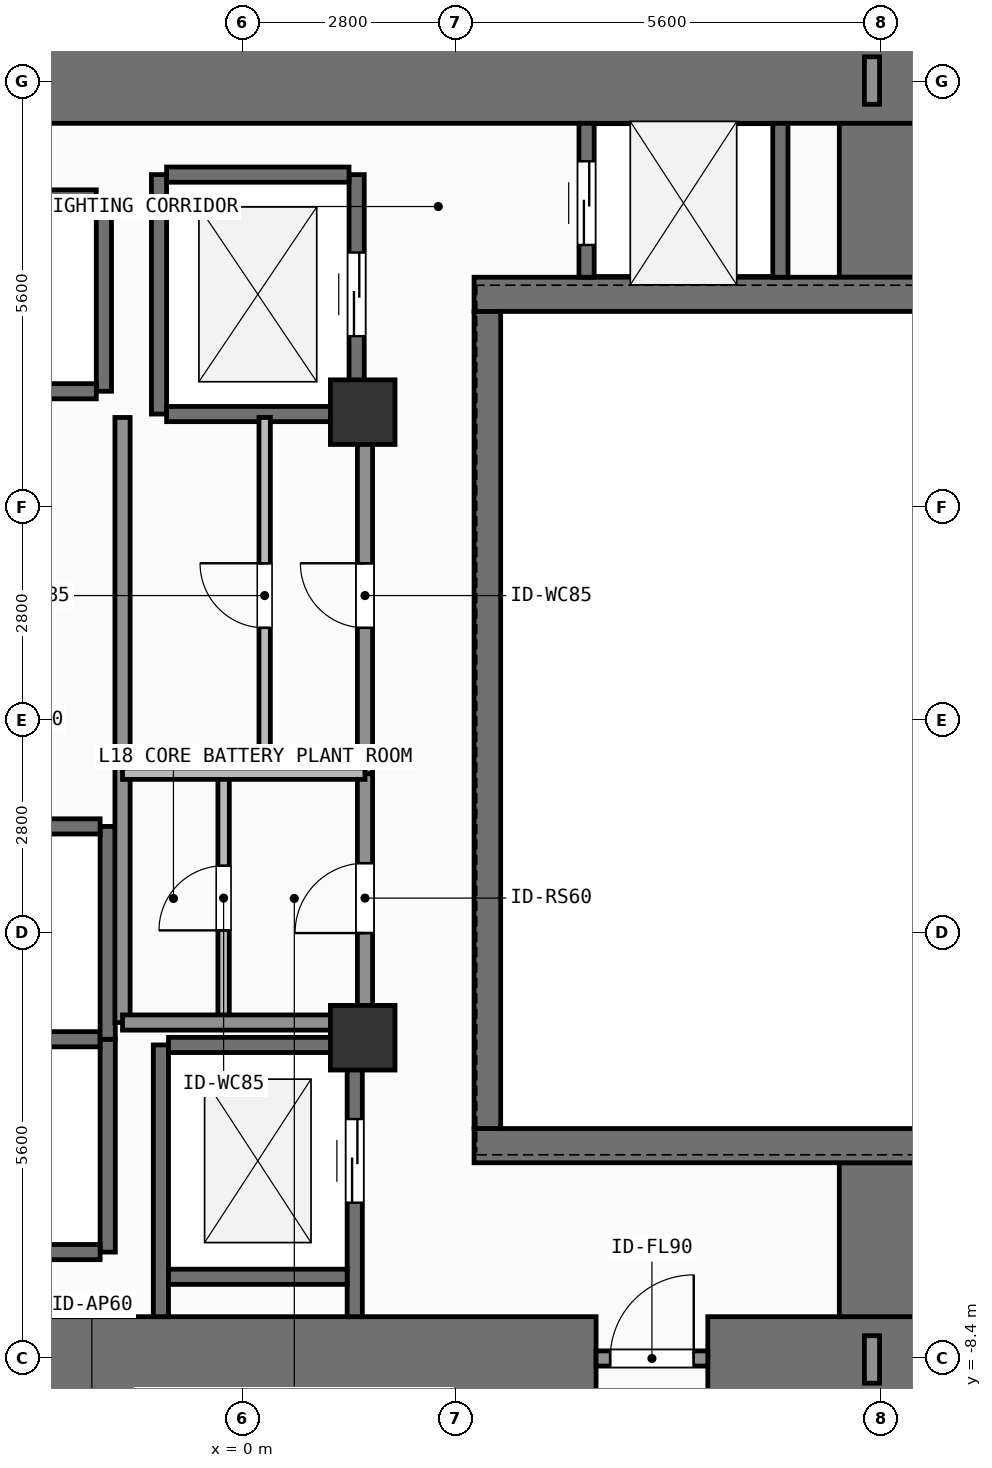
"""IFC4 building model, lengths in metres.
Left out: names, types, materials, properties, quantities, classifications, styles, units other than length and angle.
Written with IfcOpenShell. Run it as: python <this file> out.ifc"""

import sys

from ifc_helpers import new_model, si_unit, direction, frame, frame_2d, origin, origin_2d, place, context, subcontext, project, spatial, rectangle, extrude, element, fill, save


model = new_model("IFC4")
c1 = context("Model", 3, precision=1e-05, world=origin(), true_north=direction((0.0, 1.0)))
c2 = subcontext(c1, "Body", "Model", "MODEL_VIEW")
j1 = project(units=[si_unit("LENGTHUNIT", "METRE"), si_unit("PLANEANGLEUNIT", "RADIAN")], contexts=[c1])
p1 = place(None, origin())
s1 = spatial("IfcSite", under=j1, at=p1, CompositionType="ELEMENT")
p2 = place(p1, origin())
s2 = spatial("IfcBuilding", under=s1, at=p2, CompositionType="ELEMENT")
p3 = place(p2, frame((0.0, 0.0, 69.6)))
s3 = spatial("IfcBuildingStorey", under=s2, at=p3, CompositionType="ELEMENT", Elevation=69.6)
p4 = place(p3, frame((-2.62, -8.4, 0.0), z_axis=(0.0, 0.0, 1.0), x_axis=(1.0, 0.0, 0.0)))
e1 = element("IfcWall", 1, at=p4, inside=s3, PredefinedType="SHEAR", context=c2, shape_type="SweptSolid", body=[
    extrude(rectangle(XDim=7.27, YDim=1.1, at=frame_2d((3.635, 0.0))), origin(), (0.0, 0.0, 1.0), 3.9),
])
p5 = place(p3, frame((6.12, -8.4, 0.0), z_axis=(0.0, 0.0, 1.0), x_axis=(1.0, 0.0, 0.0)))
e2 = element("IfcWall", 2, at=p5, inside=s3, PredefinedType="SHEAR", context=c2, shape_type="SweptSolid", body=[
    extrude(rectangle(XDim=2.83, YDim=1.1, at=frame_2d((1.415, 0.0))), origin(), (0.0, 0.0, 1.0), 3.9),
])
p6 = place(p3, frame((-7.55, 8.4, 0.0), z_axis=(0.0, 0.0, 1.0), x_axis=(1.0, 0.0, 0.0)))
e3 = element("IfcWall", 3, at=p6, inside=s3, PredefinedType="SHEAR", context=c2, shape_type="SweptSolid", body=[
    extrude(rectangle(XDim=16.5, YDim=1.1, at=frame_2d((8.25, 0.0))), origin(), (0.0, 0.0, 1.0), 3.9),
])
for number, where, z_axis, x_axis in (
    (4, (8.4, -7.85, 0.0), (0.0, 0.0, 1.0), (0.0, 1.0, 0.0)),
    (5, (8.4, 5.825, 0.0), (0.0, 0.0, 1.0), (0.0, 1.0, 0.0)),
):
    element("IfcWall", number, at=place(p3, frame(where, z_axis=z_axis, x_axis=x_axis)), inside=s3, PredefinedType="SHEAR", context=c2, shape_type="SweptSolid", body=[
        extrude(rectangle(XDim=2.025, YDim=1.1, at=frame_2d((1.013, 0.0))), origin(), (0.0, 0.0, 1.0), 3.9),
    ])
for number, where, z_axis, x_axis in (
    (6, (3.045, -5.6, 0.0), (0.0, 0.0, 1.0), (1.0, 0.0, 0.0)),
    (7, (3.045, 5.6, 0.0), (0.0, 0.0, 1.0), (1.0, 0.0, 0.0)),
):
    element("IfcWall", number, at=place(p3, frame(where, z_axis=z_axis, x_axis=x_axis)), inside=s3, PredefinedType="SHEAR", context=c2, shape_type="SweptSolid", body=[
        extrude(rectangle(XDim=5.905, YDim=0.45, at=frame_2d((2.953, 0.0))), origin(), (0.0, 0.0, 1.0), 3.9),
    ])
p7 = place(p3, frame((3.22, -5.375, 0.0), z_axis=(0.0, 0.0, 1.0), x_axis=(0.0, 1.0, 0.0)))
e8 = element("IfcWall", 8, at=p7, inside=s3, PredefinedType="SHEAR", context=c2, shape_type="SweptSolid", body=[
    extrude(rectangle(XDim=10.75, YDim=0.35, at=frame_2d((5.375, 0.0))), origin(), (0.0, 0.0, 1.0), 3.9),
])
for number, where, z_axis, x_axis in (
    (9, (1.58, -4.18, 0.0), (0.0, 0.0, 1.0), (1.0, 0.0, 0.0)),
    (10, (1.58, 4.05, 0.0), (0.0, 0.0, 1.0), (1.0, 0.0, 0.0)),
):
    element("IfcColumn", number, at=place(p3, frame(where, z_axis=z_axis, x_axis=x_axis)), inside=s3, PredefinedType="COLUMN", context=c2, shape_type="SweptSolid", body=[
        extrude(rectangle(XDim=0.85, YDim=0.85, at=origin_2d()), origin(), (0.0, 0.0, 1.0), 3.9),
    ])
p8 = place(p3, frame((-1.825, 4.325, 0.0), z_axis=(0.0, 0.0, 1.0), x_axis=(0.0, 1.0, 0.0)))
e11 = element("IfcWall", 11, at=p8, inside=s3, PredefinedType="SHEAR", context=c2, shape_type="SweptSolid", body=[
    extrude(rectangle(XDim=2.55, YDim=0.2, at=frame_2d((1.275, 0.0))), origin(), (0.0, 0.0, 1.0), 3.68),
])
for number, where, z_axis, x_axis in (
    (12, (-4.275, 4.325, 0.0), (0.0, 0.0, 1.0), (1.0, 0.0, 0.0)),
    (13, (-4.275, 6.875, 0.0), (0.0, 0.0, 1.0), (1.0, 0.0, 0.0)),
):
    element("IfcWall", number, at=place(p3, frame(where, z_axis=z_axis, x_axis=x_axis)), inside=s3, PredefinedType="SHEAR", context=c2, shape_type="SweptSolid", body=[
        extrude(rectangle(XDim=2.35, YDim=0.2, at=frame_2d((1.175, 0.0))), origin(), (0.0, 0.0, 1.0), 3.68),
    ])
p9 = place(p3, frame((-1.775, -7.0, 0.0), z_axis=(0.0, 0.0, 1.0), x_axis=(0.0, 1.0, 0.0)))
e14 = element("IfcWall", 14, at=p9, inside=s3, PredefinedType="SHEAR", context=c2, shape_type="SweptSolid", body=[
    extrude(rectangle(XDim=2.8, YDim=0.2, at=frame_2d((1.4, 0.0))), origin(), (0.0, 0.0, 1.0), 3.68),
])
for number, where, z_axis, x_axis in (
    (15, (-4.325, -7.0, 0.0), (0.0, 0.0, 1.0), (1.0, 0.0, 0.0)),
    (16, (-4.325, -4.2, 0.0), (0.0, 0.0, 1.0), (1.0, 0.0, 0.0)),
):
    element("IfcWall", number, at=place(p3, frame(where, z_axis=z_axis, x_axis=x_axis)), inside=s3, PredefinedType="SHEAR", context=c2, shape_type="SweptSolid", body=[
        extrude(rectangle(XDim=2.45, YDim=0.2, at=frame_2d((1.225, 0.0))), origin(), (0.0, 0.0, 1.0), 3.68),
    ])
p10 = place(p3, frame((-1.775, -4.2, 0.0), z_axis=(0.0, 0.0, 1.0), x_axis=(0.0, 1.0, 0.0)))
e17 = element("IfcWall", 17, at=p10, inside=s3, PredefinedType="SHEAR", context=c2, shape_type="SweptSolid", body=[
    extrude(rectangle(XDim=2.8, YDim=0.2, at=frame_2d((1.4, 0.0))), origin(), (0.0, 0.0, 1.0), 3.68),
])
p11 = place(p3, frame((-4.325, -1.4, 0.0), z_axis=(0.0, 0.0, 1.0), x_axis=(1.0, 0.0, 0.0)))
e18 = element("IfcWall", 18, at=p11, inside=s3, PredefinedType="SHEAR", context=c2, shape_type="SweptSolid", body=[
    extrude(rectangle(XDim=2.45, YDim=0.2, at=frame_2d((1.225, 0.0))), origin(), (0.0, 0.0, 1.0), 3.68),
])
p12 = place(p3, frame((-1.1, 4.025, 0.0), z_axis=(0.0, 0.0, 1.0), x_axis=(0.0, 1.0, 0.0)))
e19 = element("IfcWall", 19, at=p12, inside=s3, PredefinedType="SHEAR", context=c2, shape_type="SweptSolid", body=[
    extrude(rectangle(XDim=3.15, YDim=0.2, at=frame_2d((1.575, 0.0))), origin(), (0.0, 0.0, 1.0), 3.68),
])
p13 = place(p3, frame((1.5, 4.025, 0.0), z_axis=(0.0, 0.0, 1.0), x_axis=(0.0, 1.0, 0.0)))
e20 = element("IfcWall", 20, at=p13, inside=s3, PredefinedType="SHEAR", context=c2, shape_type="SweptSolid", body=[
    extrude(rectangle(XDim=3.15, YDim=0.2, at=frame_2d((1.575, 0.0))), origin(), (0.0, 0.0, 1.0), 3.68),
])
p14 = place(p13, frame((1.025, 0.0, 0.0)))
e21 = element("IfcOpeningElement", 21, at=p14, cuts=e20, PredefinedType="OPENING", context=c2, shape_type="SweptSolid", body=[
    extrude(rectangle(XDim=1.1, YDim=2.2, at=frame_2d((0.55, 1.1))), frame((0.0, 0.11, 0.0), z_axis=(0.0, -1.0, 0.0), x_axis=(1.0, 0.0, 0.0)), (0.0, 0.0, 1.0), 0.22),
])
for number, where, z_axis, x_axis in (
    (22, (-1.0, 4.025, 0.0), (0.0, 0.0, 1.0), (1.0, 0.0, 0.0)),
    (23, (-1.0, 7.175, 0.0), (0.0, 0.0, 1.0), (1.0, 0.0, 0.0)),
):
    element("IfcWall", number, at=place(p3, frame(where, z_axis=z_axis, x_axis=x_axis)), inside=s3, PredefinedType="SHEAR", context=c2, shape_type="SweptSolid", body=[
        extrude(rectangle(XDim=2.4, YDim=0.2, at=frame_2d((1.2, 0.0))), origin(), (0.0, 0.0, 1.0), 3.68),
    ])
p15 = place(p3, frame((-1.075, -7.85, 0.0), z_axis=(0.0, 0.0, 1.0), x_axis=(0.0, 1.0, 0.0)))
e24 = element("IfcWall", 24, at=p15, inside=s3, PredefinedType="SHEAR", context=c2, shape_type="SweptSolid", body=[
    extrude(rectangle(XDim=3.575, YDim=0.2, at=frame_2d((1.788, 0.0))), origin(), (0.0, 0.0, 1.0), 3.68),
])
p16 = place(p3, frame((1.475, -7.85, 0.0), z_axis=(0.0, 0.0, 1.0), x_axis=(0.0, 1.0, 0.0)))
e25 = element("IfcWall", 25, at=p16, inside=s3, PredefinedType="SHEAR", context=c2, shape_type="SweptSolid", body=[
    extrude(rectangle(XDim=3.575, YDim=0.2, at=frame_2d((1.788, 0.0))), origin(), (0.0, 0.0, 1.0), 3.68),
])
p17 = place(p16, frame((1.5, 0.0, 0.0)))
e26 = element("IfcOpeningElement", 26, at=p17, cuts=e25, PredefinedType="OPENING", context=c2, shape_type="SweptSolid", body=[
    extrude(rectangle(XDim=1.1, YDim=2.2, at=frame_2d((0.55, 1.1))), frame((0.0, 0.11, 0.0), z_axis=(0.0, -1.0, 0.0), x_axis=(1.0, 0.0, 0.0)), (0.0, 0.0, 1.0), 0.22),
])
for number, where, z_axis, x_axis in (
    (27, (-0.975, -7.325, 0.0), (0.0, 0.0, 1.0), (1.0, 0.0, 0.0)),
    (28, (-0.975, -4.275, 0.0), (0.0, 0.0, 1.0), (1.0, 0.0, 0.0)),
):
    element("IfcWall", number, at=place(p3, frame(where, z_axis=z_axis, x_axis=x_axis)), inside=s3, PredefinedType="SHEAR", context=c2, shape_type="SweptSolid", body=[
        extrude(rectangle(XDim=2.35, YDim=0.2, at=frame_2d((1.175, 0.0))), origin(), (0.0, 0.0, 1.0), 3.68),
    ])
p18 = place(p3, frame((4.525, 5.825, 0.0), z_axis=(0.0, 0.0, 1.0), x_axis=(0.0, 1.0, 0.0)))
e29 = element("IfcWall", 29, at=p18, inside=s3, PredefinedType="SHEAR", context=c2, shape_type="SweptSolid", body=[
    extrude(rectangle(XDim=2.025, YDim=0.2, at=frame_2d((1.013, 0.0))), origin(), (0.0, 0.0, 1.0), 3.68),
])
p19 = place(p18, frame((0.425, 0.0, 0.0)))
e30 = element("IfcOpeningElement", 30, at=p19, cuts=e29, PredefinedType="OPENING", context=c2, shape_type="SweptSolid", body=[
    extrude(rectangle(XDim=1.1, YDim=2.2, at=frame_2d((0.55, 1.1))), frame((0.0, 0.11, 0.0), z_axis=(0.0, -1.0, 0.0), x_axis=(1.0, 0.0, 0.0)), (0.0, 0.0, 1.0), 0.22),
])
p20 = place(p3, frame((7.075, 5.825, 0.0), z_axis=(0.0, 0.0, 1.0), x_axis=(0.0, 1.0, 0.0)))
e31 = element("IfcWall", 31, at=p20, inside=s3, PredefinedType="SHEAR", context=c2, shape_type="SweptSolid", body=[
    extrude(rectangle(XDim=2.025, YDim=0.2, at=frame_2d((1.013, 0.0))), origin(), (0.0, 0.0, 1.0), 3.68),
])
p21 = place(p3, frame((4.65, -8.4, 0.0), z_axis=(0.0, 0.0, 1.0), x_axis=(1.0, 0.0, 0.0)))
e32 = element("IfcWall", 32, at=p21, inside=s3, PredefinedType="SOLIDWALL", context=c2, shape_type="SweptSolid", body=[
    extrude(rectangle(XDim=1.47, YDim=0.2, at=frame_2d((0.735, 0.0))), origin(), (0.0, 0.0, 1.0), 2.72),
])
p22 = place(p21, frame((0.185, 0.0, 0.0)))
e33 = element("IfcOpeningElement", 33, at=p22, cuts=e32, PredefinedType="OPENING", context=c2, shape_type="SweptSolid", body=[
    extrude(rectangle(XDim=1.1, YDim=2.15, at=frame_2d((0.55, 1.075))), frame((0.0, 0.11, 0.0), z_axis=(0.0, -1.0, 0.0), x_axis=(1.0, 0.0, 0.0)), (0.0, 0.0, 1.0), 0.22),
])
p23 = place(p3, frame((-0.25, -3.98, 0.0), z_axis=(0.0, 0.0, 1.0), x_axis=(0.0, 1.0, 0.0)))
e34 = element("IfcWall", 34, at=p23, inside=s3, PredefinedType="PARTITIONING", context=c2, shape_type="SweptSolid", body=[
    extrude(rectangle(XDim=3.274, YDim=0.15, at=frame_2d((1.637, 0.0))), origin(), (0.0, 0.0, 1.0), 3.68),
])
p24 = place(p23, frame((1.212, 0.0, 0.0)))
e35 = element("IfcOpeningElement", 35, at=p24, cuts=e34, PredefinedType="OPENING", context=c2, shape_type="SweptSolid", body=[
    extrude(rectangle(XDim=0.85, YDim=2.1, at=frame_2d((0.425, 1.05))), frame((0.0, 0.085, 0.0), z_axis=(0.0, -1.0, 0.0), x_axis=(1.0, 0.0, 0.0)), (0.0, 0.0, 1.0), 0.17),
])
p25 = place(p3, frame((0.29, -0.706, 0.0), z_axis=(0.0, 0.0, 1.0), x_axis=(0.0, 1.0, 0.0)))
e36 = element("IfcWall", 36, at=p25, inside=s3, PredefinedType="PARTITIONING", context=c2, shape_type="SweptSolid", body=[
    extrude(rectangle(XDim=4.686, YDim=0.15, at=frame_2d((2.343, 0.0))), origin(), (0.0, 0.0, 1.0), 3.68),
])
p26 = place(p25, frame((1.918, 0.0, 0.0)))
e37 = element("IfcOpeningElement", 37, at=p26, cuts=e36, PredefinedType="OPENING", context=c2, shape_type="SweptSolid", body=[
    extrude(rectangle(XDim=0.85, YDim=2.1, at=frame_2d((0.425, 1.05))), frame((0.0, 0.085, 0.0), z_axis=(0.0, -1.0, 0.0), x_axis=(1.0, 0.0, 0.0)), (0.0, 0.0, 1.0), 0.17),
])
p27 = place(p3, frame((1.61, -3.98, 0.0), z_axis=(0.0, 0.0, 1.0), x_axis=(0.0, 1.0, 0.0)))
e38 = element("IfcWall", 38, at=p27, inside=s3, PredefinedType="SOLIDWALL", context=c2, shape_type="SweptSolid", body=[
    extrude(rectangle(XDim=3.274, YDim=0.2, at=frame_2d((1.637, 0.0))), origin(), (0.0, 0.0, 1.0), 3.68),
])
p28 = place(p27, frame((1.177, 0.0, 0.0)))
e39 = element("IfcOpeningElement", 39, at=p28, cuts=e38, PredefinedType="OPENING", context=c2, shape_type="SweptSolid", body=[
    extrude(rectangle(XDim=0.92, YDim=2.1, at=frame_2d((0.46, 1.05))), frame((0.0, 0.11, 0.0), z_axis=(0.0, -1.0, 0.0), x_axis=(1.0, 0.0, 0.0)), (0.0, 0.0, 1.0), 0.22),
])
p29 = place(p3, frame((1.61, -0.706, 0.0), z_axis=(0.0, 0.0, 1.0), x_axis=(0.0, 1.0, 0.0)))
e40 = element("IfcWall", 40, at=p29, inside=s3, PredefinedType="SOLIDWALL", context=c2, shape_type="SweptSolid", body=[
    extrude(rectangle(XDim=4.686, YDim=0.2, at=frame_2d((2.343, 0.0))), origin(), (0.0, 0.0, 1.0), 3.68),
])
p30 = place(p29, frame((1.918, 0.0, 0.0)))
e41 = element("IfcOpeningElement", 41, at=p30, cuts=e40, PredefinedType="OPENING", context=c2, shape_type="SweptSolid", body=[
    extrude(rectangle(XDim=0.85, YDim=2.1, at=frame_2d((0.425, 1.05))), frame((0.0, 0.11, 0.0), z_axis=(0.0, -1.0, 0.0), x_axis=(1.0, 0.0, 0.0)), (0.0, 0.0, 1.0), 0.22),
])
p31 = place(p3, frame((-1.58, -3.98, 0.0), z_axis=(0.0, 0.0, 1.0), x_axis=(0.0, 1.0, 0.0)))
e42 = element("IfcWall", 42, at=p31, inside=s3, PredefinedType="SOLIDWALL", context=c2, shape_type="SweptSolid", body=[
    extrude(rectangle(XDim=7.96, YDim=0.2, at=frame_2d((3.98, 0.0))), origin(), (0.0, 0.0, 1.0), 3.68),
])
p32 = place(p3, frame((-1.58, -3.98, 0.0), z_axis=(0.0, 0.0, 1.0), x_axis=(1.0, 0.0, 0.0)))
e43 = element("IfcWall", 43, at=p32, inside=s3, PredefinedType="SOLIDWALL", context=c2, shape_type="SweptSolid", body=[
    extrude(rectangle(XDim=3.19, YDim=0.2, at=frame_2d((1.595, 0.0))), origin(), (0.0, 0.0, 1.0), 3.68),
])
p33 = place(p3, frame((-1.58, -0.706, 0.0), z_axis=(0.0, 0.0, 1.0), x_axis=(1.0, 0.0, 0.0)))
e44 = element("IfcWall", 44, at=p33, inside=s3, PredefinedType="PARTITIONING", context=c2, shape_type="SweptSolid", body=[
    extrude(rectangle(XDim=3.19, YDim=0.15, at=frame_2d((1.595, 0.0))), origin(), (0.0, 0.0, 1.0), 3.68),
])
for number, where, z_axis, x_axis in (
    (45, (8.28, -8.725, 0.0), (0.0, 0.0, 1.0), (0.0, 1.0, 0.0)),
    (46, (8.28, 8.1, 0.0), (0.0, 0.0, 1.0), (0.0, 1.0, 0.0)),
):
    element("IfcWall", number, at=place(p3, frame(where, z_axis=z_axis, x_axis=x_axis)), inside=s3, PredefinedType="SOLIDWALL", context=c2, shape_type="SweptSolid", body=[
        extrude(rectangle(XDim=0.625, YDim=0.2, at=frame_2d((0.312, 0.0))), origin(), (0.0, 0.0, 1.0), 3.68),
    ])
p34 = place(p14, origin())
e47 = element("IfcDoor", 47, at=p34, inside=s3, OperationType="SLIDING_TO_LEFT", PredefinedType="DOOR", context=c2, shape_type="SweptSolid", body=[
    extrude(rectangle(XDim=1.1, YDim=2.2, at=frame_2d((0.55, 1.1))), frame((0.0, 0.025, 0.0), z_axis=(0.0, -1.0, 0.0), x_axis=(1.0, 0.0, 0.0)), (0.0, 0.0, 1.0), 0.05),
])
fill(e21, e47)
p35 = place(p17, origin())
e48 = element("IfcDoor", 48, at=p35, inside=s3, OperationType="SLIDING_TO_LEFT", PredefinedType="DOOR", context=c2, shape_type="SweptSolid", body=[
    extrude(rectangle(XDim=1.1, YDim=2.2, at=frame_2d((0.55, 1.1))), frame((0.0, 0.025, 0.0), z_axis=(0.0, -1.0, 0.0), x_axis=(1.0, 0.0, 0.0)), (0.0, 0.0, 1.0), 0.05),
])
fill(e26, e48)
p36 = place(p19, origin())
e49 = element("IfcDoor", 49, at=p36, inside=s3, OperationType="SLIDING_TO_LEFT", PredefinedType="DOOR", context=c2, shape_type="SweptSolid", body=[
    extrude(rectangle(XDim=1.1, YDim=2.2, at=frame_2d((0.55, 1.1))), frame((0.0, 0.025, 0.0), z_axis=(0.0, -1.0, 0.0), x_axis=(1.0, 0.0, 0.0)), (0.0, 0.0, 1.0), 0.05),
])
fill(e30, e49)
p37 = place(p22, origin())
e50 = element("IfcDoor", 50, at=p37, inside=s3, OperationType="SINGLE_SWING_RIGHT", PredefinedType="DOOR", context=c2, shape_type="SweptSolid", body=[
    extrude(rectangle(XDim=1.1, YDim=2.15, at=frame_2d((0.55, 1.075))), frame((0.0, 0.025, 0.0), z_axis=(0.0, -1.0, 0.0), x_axis=(1.0, 0.0, 0.0)), (0.0, 0.0, 1.0), 0.05),
])
fill(e33, e50)
p38 = place(p24, origin())
e51 = element("IfcDoor", 51, at=p38, inside=s3, OperationType="SINGLE_SWING_LEFT", PredefinedType="DOOR", context=c2, shape_type="SweptSolid", body=[
    extrude(rectangle(XDim=0.85, YDim=2.1, at=frame_2d((0.425, 1.05))), frame((0.0, 0.025, 0.0), z_axis=(0.0, -1.0, 0.0), x_axis=(1.0, 0.0, 0.0)), (0.0, 0.0, 1.0), 0.05),
])
fill(e35, e51)
p39 = place(p26, origin())
e52 = element("IfcDoor", 52, at=p39, inside=s3, OperationType="SINGLE_SWING_RIGHT", PredefinedType="DOOR", context=c2, shape_type="SweptSolid", body=[
    extrude(rectangle(XDim=0.85, YDim=2.1, at=frame_2d((0.425, 1.05))), frame((0.0, 0.025, 0.0), z_axis=(0.0, -1.0, 0.0), x_axis=(1.0, 0.0, 0.0)), (0.0, 0.0, 1.0), 0.05),
])
fill(e37, e52)
p40 = place(p28, origin())
e53 = element("IfcDoor", 53, at=p40, inside=s3, OperationType="SINGLE_SWING_LEFT", PredefinedType="DOOR", context=c2, shape_type="SweptSolid", body=[
    extrude(rectangle(XDim=0.92, YDim=2.1, at=frame_2d((0.46, 1.05))), frame((0.0, 0.025, 0.0), z_axis=(0.0, -1.0, 0.0), x_axis=(1.0, 0.0, 0.0)), (0.0, 0.0, 1.0), 0.05),
])
fill(e39, e53)
p41 = place(p30, origin())
e54 = element("IfcDoor", 54, at=p41, inside=s3, OperationType="SINGLE_SWING_RIGHT", PredefinedType="DOOR", context=c2, shape_type="SweptSolid", body=[
    extrude(rectangle(XDim=0.85, YDim=2.1, at=frame_2d((0.425, 1.05))), frame((0.0, 0.025, 0.0), z_axis=(0.0, -1.0, 0.0), x_axis=(1.0, 0.0, 0.0)), (0.0, 0.0, 1.0), 0.05),
])
fill(e41, e54)
save(model, sys.argv[1])
